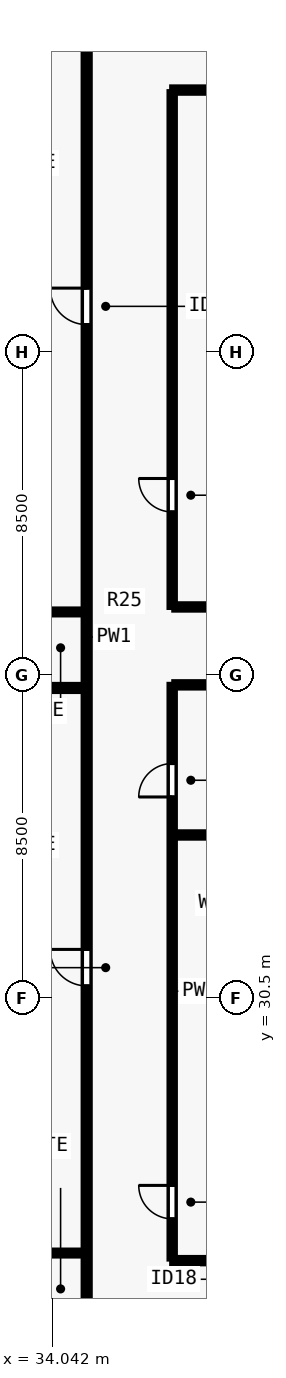
"""IFC4 building model, lengths in metres.
Left out: names, types, materials, properties, quantities, classifications, styles, units other than length and angle.
Written with IfcOpenShell. Run it as: python <this file> out.ifc"""

import sys

from ifc_helpers import new_model, si_unit, direction, frame, frame_2d, origin, place, context, subcontext, project, spatial, rectangle, extrude, element, fill, save


model = new_model("IFC4")
c1 = context("Model", 3, precision=1e-05, world=origin(), true_north=direction((0.0, 1.0)))
c2 = subcontext(c1, "Body", "Model", "MODEL_VIEW")
j1 = project(units=[si_unit("LENGTHUNIT", "METRE"), si_unit("PLANEANGLEUNIT", "RADIAN")], contexts=[c1])
p1 = place(None, origin())
s1 = spatial("IfcSite", under=j1, at=p1, CompositionType="ELEMENT")
p2 = place(p1, origin())
s2 = spatial("IfcBuilding", under=s1, at=p2, CompositionType="ELEMENT")
p3 = place(p2, frame((0.0, 0.0, 65.5)))
s3 = spatial("IfcBuildingStorey", under=s2, at=p3, CompositionType="ELEMENT", Elevation=65.5)
p4 = place(p3, frame((34.95, 21.415, 0.0), z_axis=(0.0, 0.0, 1.0), x_axis=(0.0, 1.0, 0.0)))
e1 = element("IfcWall", 1, at=p4, inside=s3, PredefinedType="PARTITIONING", context=c2, shape_type="SweptSolid", body=[
    extrude(rectangle(XDim=35.17, YDim=0.16, at=frame_2d((17.585, 0.0))), origin(), (0.0, 0.0, 1.0), 3.28),
])
p5 = place(p4, frame((9.414, 0.0, 0.0)))
e2 = element("IfcOpeningElement", 2, at=p5, cuts=e1, PredefinedType="OPENING", context=c2, shape_type="SweptSolid", body=[
    extrude(rectangle(XDim=0.96, YDim=2.15, at=frame_2d((0.48, 1.075))), frame((0.0, 0.09, 0.0), z_axis=(0.0, -1.0, 0.0), x_axis=(1.0, 0.0, 0.0)), (0.0, 0.0, 1.0), 0.18),
])
p6 = place(p4, frame((26.814, 0.0, 0.0)))
e3 = element("IfcOpeningElement", 3, at=p6, cuts=e1, PredefinedType="OPENING", context=c2, shape_type="SweptSolid", body=[
    extrude(rectangle(XDim=0.96, YDim=2.15, at=frame_2d((0.48, 1.075))), frame((0.0, 0.09, 0.0), z_axis=(0.0, -1.0, 0.0), x_axis=(1.0, 0.0, 0.0)), (0.0, 0.0, 1.0), 0.18),
])
p7 = place(p3, frame((37.2, 23.6, 0.0), z_axis=(0.0, 0.0, 1.0), x_axis=(1.0, 0.0, 0.0)))
e4 = element("IfcWall", 4, at=p7, inside=s3, PredefinedType="PARTITIONING", context=c2, shape_type="SweptSolid", body=[
    extrude(rectangle(XDim=29.6, YDim=0.14, at=frame_2d((14.8, 0.0))), origin(), (0.0, 0.0, 1.0), 3.28),
])
p8 = place(p7, frame((1.2, 0.0, 0.0)))
e5 = element("IfcOpeningElement", 5, at=p8, cuts=e4, PredefinedType="OPENING", context=c2, shape_type="SweptSolid", body=[
    extrude(rectangle(XDim=0.88, YDim=2.1, at=frame_2d((0.44, 1.05))), frame((0.0, 0.08, 0.0), z_axis=(0.0, -1.0, 0.0), x_axis=(1.0, 0.0, 0.0)), (0.0, 0.0, 1.0), 0.16),
])
p9 = place(p7, frame((11.3, 0.0, 0.0)))
e6 = element("IfcOpeningElement", 6, at=p9, cuts=e4, PredefinedType="OPENING", context=c2, shape_type="SweptSolid", body=[
    extrude(rectangle(XDim=0.88, YDim=2.1, at=frame_2d((0.44, 1.05))), frame((0.0, 0.08, 0.0), z_axis=(0.0, -1.0, 0.0), x_axis=(1.0, 0.0, 0.0)), (0.0, 0.0, 1.0), 0.16),
])
p10 = place(p7, frame((21.8, 0.0, 0.0)))
e7 = element("IfcOpeningElement", 7, at=p10, cuts=e4, PredefinedType="OPENING", context=c2, shape_type="SweptSolid", body=[
    extrude(rectangle(XDim=0.88, YDim=2.1, at=frame_2d((0.44, 1.05))), frame((0.0, 0.08, 0.0), z_axis=(0.0, -1.0, 0.0), x_axis=(1.0, 0.0, 0.0)), (0.0, 0.0, 1.0), 0.16),
])
p11 = place(p3, frame((37.2, 54.4, 0.0), z_axis=(0.0, 0.0, 1.0), x_axis=(1.0, 0.0, 0.0)))
e8 = element("IfcWall", 8, at=p11, inside=s3, PredefinedType="PARTITIONING", context=c2, shape_type="SweptSolid", body=[
    extrude(rectangle(XDim=29.6, YDim=0.14, at=frame_2d((14.8, 0.0))), origin(), (0.0, 0.0, 1.0), 3.28),
])
p12 = place(p11, frame((2.2, 0.0, 0.0)))
e9 = element("IfcOpeningElement", 9, at=p12, cuts=e8, PredefinedType="OPENING", context=c2, shape_type="SweptSolid", body=[
    extrude(rectangle(XDim=0.88, YDim=2.1, at=frame_2d((0.44, 1.05))), frame((0.0, 0.08, 0.0), z_axis=(0.0, -1.0, 0.0), x_axis=(1.0, 0.0, 0.0)), (0.0, 0.0, 1.0), 0.16),
])
p13 = place(p11, frame((15.3, 0.0, 0.0)))
e10 = element("IfcOpeningElement", 10, at=p13, cuts=e8, PredefinedType="OPENING", context=c2, shape_type="SweptSolid", body=[
    extrude(rectangle(XDim=0.88, YDim=2.1, at=frame_2d((0.44, 1.05))), frame((0.0, 0.08, 0.0), z_axis=(0.0, -1.0, 0.0), x_axis=(1.0, 0.0, 0.0)), (0.0, 0.0, 1.0), 0.16),
])
p14 = place(p11, frame((24.8, 0.0, 0.0)))
e11 = element("IfcOpeningElement", 11, at=p14, cuts=e8, PredefinedType="OPENING", context=c2, shape_type="SweptSolid", body=[
    extrude(rectangle(XDim=0.88, YDim=2.1, at=frame_2d((0.44, 1.05))), frame((0.0, 0.08, 0.0), z_axis=(0.0, -1.0, 0.0), x_axis=(1.0, 0.0, 0.0)), (0.0, 0.0, 1.0), 0.16),
])
p15 = place(p3, frame((37.2, 23.655, 0.0), z_axis=(0.0, 0.0, 1.0), x_axis=(0.0, 1.0, 0.0)))
e12 = element("IfcWall", 12, at=p15, inside=s3, PredefinedType="PARTITIONING", context=c2, shape_type="SweptSolid", body=[
    extrude(rectangle(XDim=15.095, YDim=0.14, at=frame_2d((7.547, 0.0))), origin(), (0.0, 0.0, 1.0), 3.28),
])
p16 = place(p15, frame((1.045, 0.0, 0.0)))
e13 = element("IfcOpeningElement", 13, at=p16, cuts=e12, PredefinedType="OPENING", context=c2, shape_type="SweptSolid", body=[
    extrude(rectangle(XDim=0.88, YDim=2.1, at=frame_2d((0.44, 1.05))), frame((0.0, 0.08, 0.0), z_axis=(0.0, -1.0, 0.0), x_axis=(1.0, 0.0, 0.0)), (0.0, 0.0, 1.0), 0.16),
])
p17 = place(p15, frame((12.145, 0.0, 0.0)))
e14 = element("IfcOpeningElement", 14, at=p17, cuts=e12, PredefinedType="OPENING", context=c2, shape_type="SweptSolid", body=[
    extrude(rectangle(XDim=0.88, YDim=2.1, at=frame_2d((0.44, 1.05))), frame((0.0, 0.08, 0.0), z_axis=(0.0, -1.0, 0.0), x_axis=(1.0, 0.0, 0.0)), (0.0, 0.0, 1.0), 0.16),
])
p18 = place(p3, frame((37.2, 40.8, 0.0), z_axis=(0.0, 0.0, 1.0), x_axis=(0.0, 1.0, 0.0)))
e15 = element("IfcWall", 15, at=p18, inside=s3, PredefinedType="PARTITIONING", context=c2, shape_type="SweptSolid", body=[
    extrude(rectangle(XDim=13.545, YDim=0.14, at=frame_2d((6.772, 0.0))), origin(), (0.0, 0.0, 1.0), 3.28),
])
p19 = place(p18, frame((2.5, 0.0, 0.0)))
e16 = element("IfcOpeningElement", 16, at=p19, cuts=e15, PredefinedType="OPENING", context=c2, shape_type="SweptSolid", body=[
    extrude(rectangle(XDim=0.88, YDim=2.1, at=frame_2d((0.44, 1.05))), frame((0.0, 0.08, 0.0), z_axis=(0.0, -1.0, 0.0), x_axis=(1.0, 0.0, 0.0)), (0.0, 0.0, 1.0), 0.16),
])
for number, where, z_axis, x_axis in (
    (17, (37.255, 38.75, 0.0), (0.0, 0.0, 1.0), (1.0, 0.0, 0.0)),
    (18, (37.255, 40.8, 0.0), (0.0, 0.0, 1.0), (1.0, 0.0, 0.0)),
    (19, (37.255, 34.8, 0.0), (0.0, 0.0, 1.0), (1.0, 0.0, 0.0)),
):
    element("IfcWall", number, at=place(p3, frame(where, z_axis=z_axis, x_axis=x_axis)), inside=s3, PredefinedType="PARTITIONING", context=c2, shape_type="SweptSolid", body=[
        extrude(rectangle(XDim=5.985, YDim=0.14, at=frame_2d((2.993, 0.0))), origin(), (0.0, 0.0, 1.0), 3.28),
    ])
p20 = place(p3, frame((32.65, 23.8, 0.0), z_axis=(0.0, 0.0, 1.0), x_axis=(1.0, 0.0, 0.0)))
e20 = element("IfcWall", 20, at=p20, inside=s3, PredefinedType="PLUMBINGWALL", context=c2, shape_type="SweptSolid", body=[
    extrude(rectangle(XDim=2.235, YDim=0.13, at=frame_2d((1.118, 0.0))), origin(), (0.0, 0.0, 1.0), 3.28),
])
p21 = place(p3, frame((26.845, 38.668, 0.0), z_axis=(0.0, 0.0, 1.0), x_axis=(1.0, 0.0, 0.0)))
e21 = element("IfcWall", 21, at=p21, inside=s3, PredefinedType="PARTITIONING", context=c2, shape_type="SweptSolid", body=[
    extrude(rectangle(XDim=8.04, YDim=0.16, at=frame_2d((4.02, 0.0))), origin(), (0.0, 0.0, 1.0), 2.849),
])
p22 = place(p3, frame((32.65, 40.668, 0.0), z_axis=(0.0, 0.0, 1.0), x_axis=(1.0, 0.0, 0.0)))
e22 = element("IfcWall", 22, at=p22, inside=s3, PredefinedType="PLUMBINGWALL", context=c2, shape_type="SweptSolid", body=[
    extrude(rectangle(XDim=2.235, YDim=0.13, at=frame_2d((1.118, 0.0))), origin(), (0.0, 0.0, 1.0), 3.28),
])
p23 = place(p16, origin())
e23 = element("IfcDoor", 23, at=p23, inside=s3, OperationType="SINGLE_SWING_RIGHT", PredefinedType="DOOR", context=c2, shape_type="SweptSolid", body=[
    extrude(rectangle(XDim=0.88, YDim=2.1, at=frame_2d((0.44, 1.05))), frame((0.0, 0.025, 0.0), z_axis=(0.0, -1.0, 0.0), x_axis=(1.0, 0.0, 0.0)), (0.0, 0.0, 1.0), 0.05),
])
fill(e13, e23)
p24 = place(p17, origin())
e24 = element("IfcDoor", 24, at=p24, inside=s3, OperationType="SINGLE_SWING_LEFT", PredefinedType="DOOR", context=c2, shape_type="SweptSolid", body=[
    extrude(rectangle(XDim=0.88, YDim=2.1, at=frame_2d((0.44, 1.05))), frame((0.0, 0.025, 0.0), z_axis=(0.0, -1.0, 0.0), x_axis=(1.0, 0.0, 0.0)), (0.0, 0.0, 1.0), 0.05),
])
fill(e14, e24)
p25 = place(p19, origin())
e25 = element("IfcDoor", 25, at=p25, inside=s3, OperationType="SINGLE_SWING_RIGHT", PredefinedType="DOOR", context=c2, shape_type="SweptSolid", body=[
    extrude(rectangle(XDim=0.88, YDim=2.1, at=frame_2d((0.44, 1.05))), frame((0.0, 0.025, 0.0), z_axis=(0.0, -1.0, 0.0), x_axis=(1.0, 0.0, 0.0)), (0.0, 0.0, 1.0), 0.05),
])
fill(e16, e25)
p26 = place(p5, origin())
e26 = element("IfcDoor", 26, at=p26, inside=s3, OperationType="SINGLE_SWING_RIGHT", PredefinedType="DOOR", context=c2, shape_type="SweptSolid", body=[
    extrude(rectangle(XDim=0.96, YDim=2.15, at=frame_2d((0.48, 1.075))), frame((0.0, 0.025, 0.0), z_axis=(0.0, -1.0, 0.0), x_axis=(1.0, 0.0, 0.0)), (0.0, 0.0, 1.0), 0.05),
])
fill(e2, e26)
p27 = place(p6, origin())
e27 = element("IfcDoor", 27, at=p27, inside=s3, OperationType="SINGLE_SWING_RIGHT", PredefinedType="DOOR", context=c2, shape_type="SweptSolid", body=[
    extrude(rectangle(XDim=0.96, YDim=2.15, at=frame_2d((0.48, 1.075))), frame((0.0, 0.025, 0.0), z_axis=(0.0, -1.0, 0.0), x_axis=(1.0, 0.0, 0.0)), (0.0, 0.0, 1.0), 0.05),
])
fill(e3, e27)
save(model, sys.argv[1])
